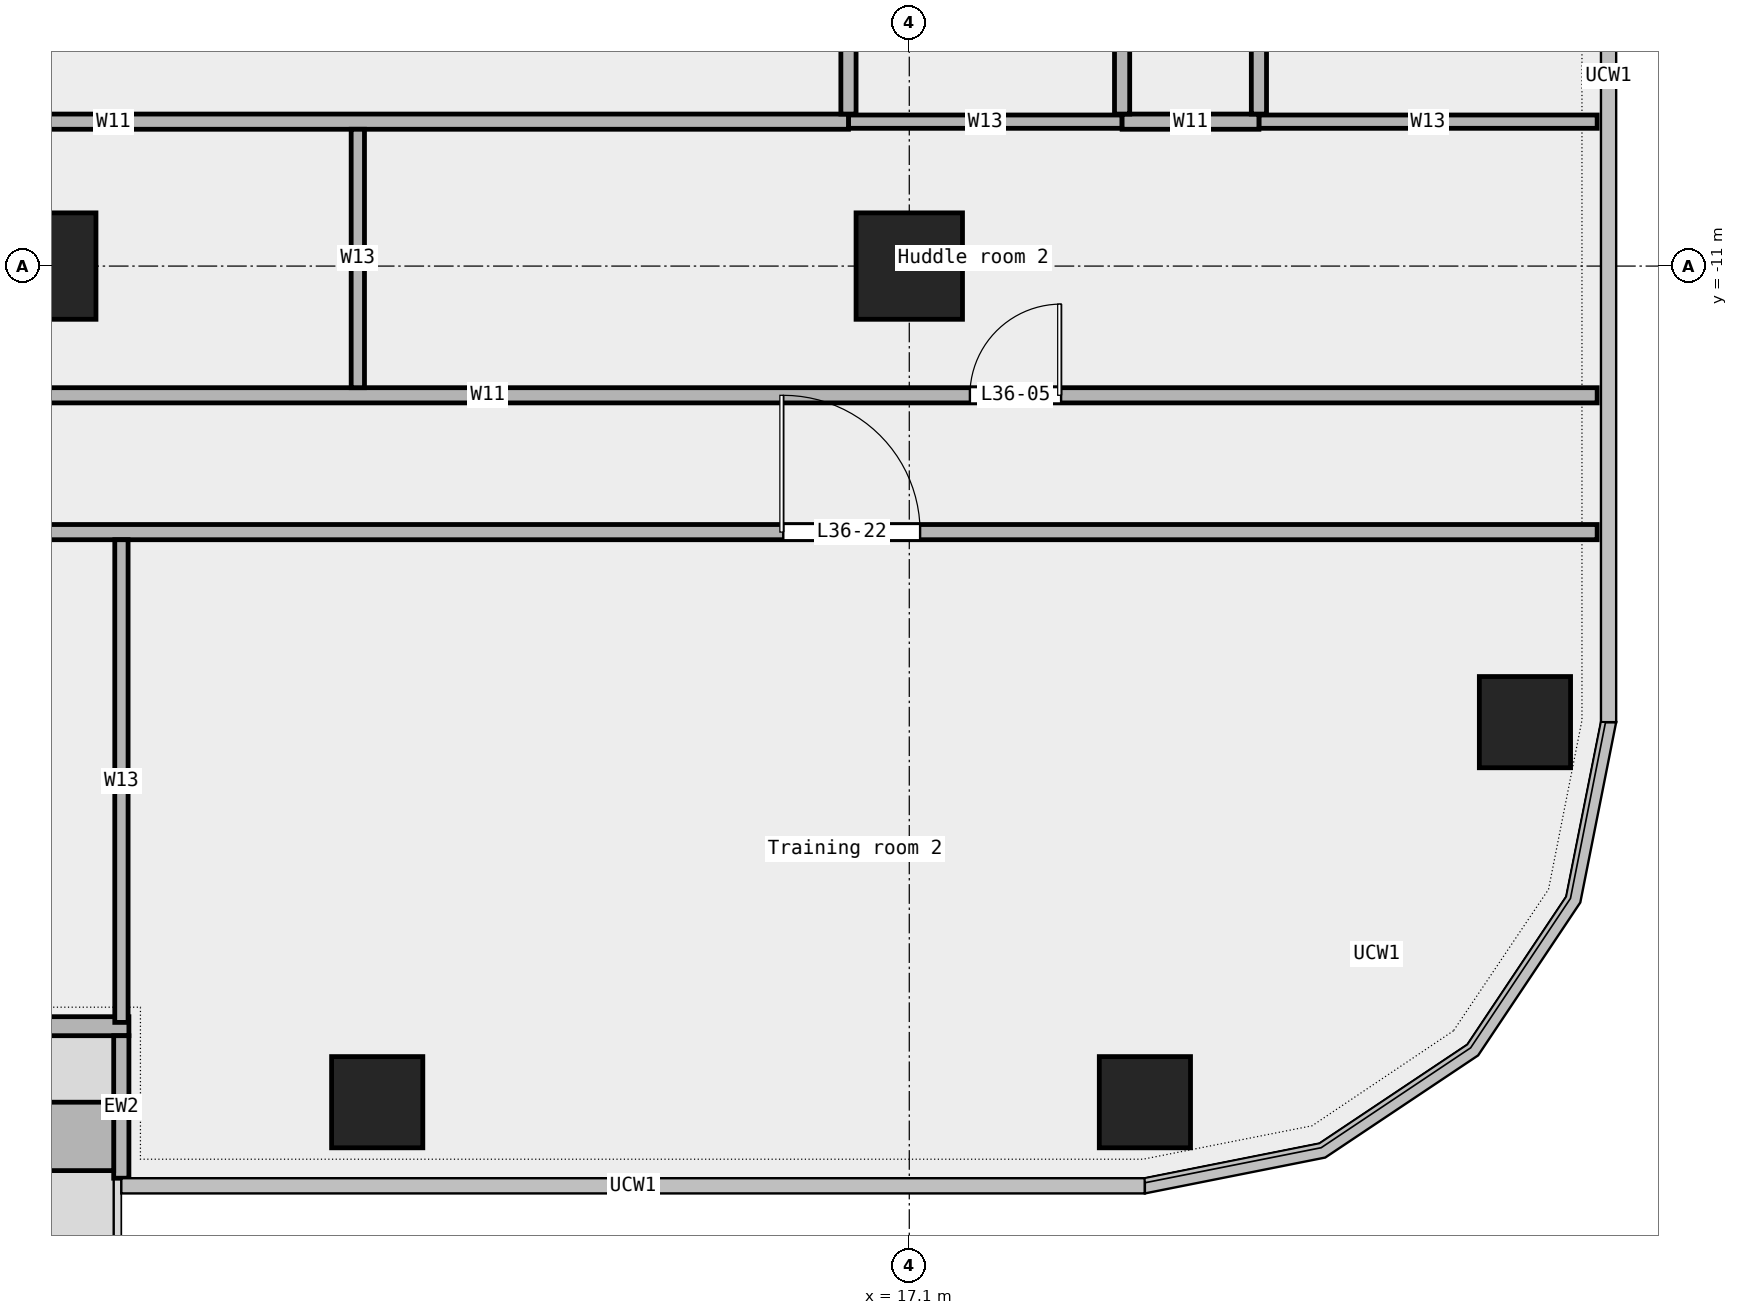
"""IFC4 building model, lengths in metres.
Left out: names, types, materials, properties, quantities, classifications, styles, units other than length and angle.
Written with IfcOpenShell. Run it as: python <this file> out.ifc"""

import sys

from ifc_helpers import new_model, si_unit, direction, frame, frame_2d, origin, origin_2d, place, context, subcontext, project, spatial, rectangle, extrude, element, fill, save


model = new_model("IFC4")
c1 = context("Model", 3, precision=1e-05, world=origin(), true_north=direction((0.0, 1.0)))
c2 = subcontext(c1, "Body", "Model", "MODEL_VIEW")
j1 = project(units=[si_unit("LENGTHUNIT", "METRE"), si_unit("PLANEANGLEUNIT", "RADIAN")], contexts=[c1])
p1 = place(None, origin())
s1 = spatial("IfcSite", under=j1, at=p1, CompositionType="ELEMENT")
p2 = place(p1, origin())
s2 = spatial("IfcBuilding", under=s1, at=p2, CompositionType="ELEMENT")
p3 = place(p2, frame((0.0, 0.0, 177.0)))
s3 = spatial("IfcBuildingStorey", under=s2, at=p3, CompositionType="ELEMENT", Elevation=177.0)
for number, where, z_axis, x_axis in (
    (1, (10.1, -22.0, 0.0), (0.0, 0.0, 1.0), (1.0, 0.0, 0.0)),
    (2, (20.2, -22.0, 0.0), (0.0, 0.0, 1.0), (1.0, 0.0, 0.0)),
    (3, (25.2, -17.0, 0.0), (0.0, 0.0, 1.0), (1.0, 0.0, 0.0)),
):
    element("IfcColumn", number, at=place(p3, frame(where, z_axis=z_axis, x_axis=x_axis)), inside=s3, PredefinedType="COLUMN", context=c2, shape_type="SweptSolid", body=[
        extrude(rectangle(XDim=1.2, YDim=1.2, at=origin_2d()), origin(), (0.0, 0.0, 1.0), 3.6),
    ])
for number, where, z_axis, x_axis in (
    (4, (5.7, -11.0, 0.0), (0.0, 0.0, 1.0), (1.0, 0.0, 0.0)),
    (5, (17.1, -11.0, 0.0), (0.0, 0.0, 1.0), (1.0, 0.0, 0.0)),
):
    element("IfcColumn", number, at=place(p3, frame(where, z_axis=z_axis, x_axis=x_axis)), inside=s3, PredefinedType="COLUMN", context=c2, shape_type="SweptSolid", body=[
        extrude(rectangle(XDim=1.4, YDim=1.4, at=origin_2d()), origin(), (0.0, 0.0, 1.0), 3.6),
    ])
p4 = place(p3, frame((-6.833, -21.0, 0.0), z_axis=(0.0, 0.0, 1.0), x_axis=(1.0, 0.0, 0.0)))
e6 = element("IfcWall", 6, at=p4, inside=s3, PredefinedType="STANDARD", context=c2, shape_type="SweptSolid", body=[
    extrude(rectangle(XDim=13.667, YDim=0.25, at=frame_2d((6.833, 0.0))), origin(), (0.0, 0.0, 1.0), 3.6),
])
p5 = place(p4, frame((1.75, 0.0, 0.45)))
e7 = element("IfcOpeningElement", 7, at=p5, cuts=e6, PredefinedType="OPENING", context=c2, shape_type="SweptSolid", body=[
    extrude(rectangle(XDim=1.5, YDim=2.4, at=frame_2d((0.75, 1.2))), frame((0.0, 0.137, 0.0), z_axis=(0.0, -1.0, 0.0), x_axis=(1.0, 0.0, 0.0)), (0.0, 0.0, 1.0), 0.274),
])
p6 = place(p4, frame((7.75, 0.0, 0.0)))
e8 = element("IfcOpeningElement", 8, at=p6, cuts=e6, PredefinedType="OPENING", context=c2, shape_type="SweptSolid", body=[
    extrude(rectangle(XDim=1.8, YDim=2.4, at=frame_2d((0.9, 1.2))), frame((0.0, 0.137, 0.0), z_axis=(0.0, -1.0, 0.0), x_axis=(1.0, 0.0, 0.0)), (0.0, 0.0, 1.0), 0.274),
])
p7 = place(p4, frame((10.5, 0.0, 0.45)))
e9 = element("IfcOpeningElement", 9, at=p7, cuts=e6, PredefinedType="OPENING", context=c2, shape_type="SweptSolid", body=[
    extrude(rectangle(XDim=1.5, YDim=2.4, at=frame_2d((0.75, 1.2))), frame((0.0, 0.137, 0.0), z_axis=(0.0, -1.0, 0.0), x_axis=(1.0, 0.0, 0.0)), (0.0, 0.0, 1.0), 0.274),
])
p8 = place(p3, frame((6.733, -23.0, 0.0), z_axis=(0.0, 0.0, 1.0), x_axis=(0.0, 1.0, 0.0)))
e10 = element("IfcWall", 10, at=p8, inside=s3, PredefinedType="STANDARD", context=c2, shape_type="SweptSolid", body=[
    extrude(rectangle(XDim=1.875, YDim=0.2, at=frame_2d((0.938, 0.0))), origin(), (0.0, 0.0, 1.0), 3.6),
])
p9 = place(p3, frame((3.033, -22.45, 0.0), z_axis=(0.0, 0.0, 1.0), x_axis=(1.0, 0.0, 0.0)))
e11 = element("IfcWall", 11, at=p9, inside=s3, PredefinedType="STANDARD", context=c2, shape_type="SweptSolid", body=[
    extrude(rectangle(XDim=3.6, YDim=0.9, at=frame_2d((1.8, 0.0))), origin(), (0.0, 0.0, 1.0), 0.7),
])
p10 = place(p3, frame((-26.15, -14.5, 0.0), z_axis=(0.0, 0.0, 1.0), x_axis=(1.0, 0.0, 0.0)))
e12 = element("IfcWall", 12, at=p10, inside=s3, PredefinedType="PARTITIONING", context=c2, shape_type="SweptSolid", body=[
    extrude(rectangle(XDim=52.3, YDim=0.2, at=frame_2d((26.15, 0.0))), origin(), (0.0, 0.0, 1.0), 3.6),
])
p11 = place(p10, frame((8.907, 0.0, 0.0)))
e13 = element("IfcOpeningElement", 13, at=p11, cuts=e12, PredefinedType="OPENING", context=c2, shape_type="SweptSolid", body=[
    extrude(rectangle(XDim=1.8, YDim=2.1, at=frame_2d((0.9, 1.05))), frame((0.0, 0.112, 0.0), z_axis=(0.0, -1.0, 0.0), x_axis=(1.0, 0.0, 0.0)), (0.0, 0.0, 1.0), 0.224),
])
p12 = place(p10, frame((25.55, 0.0, 0.0)))
e14 = element("IfcOpeningElement", 14, at=p12, cuts=e12, PredefinedType="OPENING", context=c2, shape_type="SweptSolid", body=[
    extrude(rectangle(XDim=1.2, YDim=2.1, at=frame_2d((0.6, 1.05))), frame((0.0, 0.112, 0.0), z_axis=(0.0, -1.0, 0.0), x_axis=(1.0, 0.0, 0.0)), (0.0, 0.0, 1.0), 0.224),
])
p13 = place(p10, frame((41.593, 0.0, 0.0)))
e15 = element("IfcOpeningElement", 15, at=p13, cuts=e12, PredefinedType="OPENING", context=c2, shape_type="SweptSolid", body=[
    extrude(rectangle(XDim=1.8, YDim=2.1, at=frame_2d((0.9, 1.05))), frame((0.0, 0.112, 0.0), z_axis=(0.0, -1.0, 0.0), x_axis=(1.0, 0.0, 0.0)), (0.0, 0.0, 1.0), 0.224),
])
p14 = place(p3, frame((-3.04, -12.7, 0.0), z_axis=(0.0, 0.0, 1.0), x_axis=(1.0, 0.0, 0.0)))
e16 = element("IfcWall", 16, at=p14, inside=s3, PredefinedType="PARTITIONING", context=c2, shape_type="SweptSolid", body=[
    extrude(rectangle(XDim=29.19, YDim=0.2, at=frame_2d((14.595, 0.0))), origin(), (0.0, 0.0, 1.0), 3.6),
])
p15 = place(p14, frame((20.938, 0.0, 0.0)))
e17 = element("IfcOpeningElement", 17, at=p15, cuts=e16, PredefinedType="OPENING", context=c2, shape_type="SweptSolid", body=[
    extrude(rectangle(XDim=1.2, YDim=2.1, at=frame_2d((0.6, 1.05))), frame((0.0, 0.112, 0.0), z_axis=(0.0, -1.0, 0.0), x_axis=(1.0, 0.0, 0.0)), (0.0, 0.0, 1.0), 0.224),
])
p16 = place(p3, frame((16.3, -9.1, 0.0), z_axis=(0.0, 0.0, 1.0), x_axis=(1.0, 0.0, 0.0)))
e18 = element("IfcWall", 18, at=p16, inside=s3, PredefinedType="PARTITIONING", context=c2, shape_type="SweptSolid", body=[
    extrude(rectangle(XDim=3.6, YDim=0.175, at=frame_2d((1.8, 0.0))), origin(), (0.0, 0.0, 1.0), 3.6),
])
p17 = place(p3, frame((21.7, -9.1, 0.0), z_axis=(0.0, 0.0, 1.0), x_axis=(1.0, 0.0, 0.0)))
e19 = element("IfcWall", 19, at=p17, inside=s3, PredefinedType="PARTITIONING", context=c2, shape_type="SweptSolid", body=[
    extrude(rectangle(XDim=4.45, YDim=0.175, at=frame_2d((2.225, 0.0))), origin(), (0.0, 0.0, 1.0), 3.6),
])
p18 = place(p3, frame((-3.04, -9.1, 0.0), z_axis=(0.0, 0.0, 1.0), x_axis=(1.0, 0.0, 0.0)))
e20 = element("IfcWall", 20, at=p18, inside=s3, PredefinedType="PARTITIONING", context=c2, shape_type="SweptSolid", body=[
    extrude(rectangle(XDim=19.34, YDim=0.2, at=frame_2d((9.67, 0.0))), origin(), (0.0, 0.0, 1.0), 3.6),
])
p19 = place(p18, frame((5.942, 0.0, 0.0)))
e21 = element("IfcOpeningElement", 21, at=p19, cuts=e20, PredefinedType="OPENING", context=c2, shape_type="SweptSolid", body=[
    extrude(rectangle(XDim=1.0, YDim=2.1, at=frame_2d((0.5, 1.05))), frame((0.0, 0.112, 0.0), z_axis=(0.0, -1.0, 0.0), x_axis=(1.0, 0.0, 0.0)), (0.0, 0.0, 1.0), 0.224),
])
p20 = place(p3, frame((19.9, -9.1, 0.0), z_axis=(0.0, 0.0, 1.0), x_axis=(1.0, 0.0, 0.0)))
e22 = element("IfcWall", 22, at=p20, inside=s3, PredefinedType="PARTITIONING", context=c2, shape_type="SweptSolid", body=[
    extrude(rectangle(XDim=1.8, YDim=0.2, at=frame_2d((0.9, 0.0))), origin(), (0.0, 0.0, 1.0), 3.6),
])
p21 = place(p3, frame((6.735, -20.95, 0.0), z_axis=(0.0, 0.0, 1.0), x_axis=(0.0, 1.0, 0.0)))
e23 = element("IfcWall", 23, at=p21, inside=s3, PredefinedType="PARTITIONING", context=c2, shape_type="SweptSolid", body=[
    extrude(rectangle(XDim=6.35, YDim=0.175, at=frame_2d((3.175, 0.0))), origin(), (0.0, 0.0, 1.0), 3.6),
])
p22 = place(p3, frame((9.845, -12.6, 0.0), z_axis=(0.0, 0.0, 1.0), x_axis=(0.0, 1.0, 0.0)))
e24 = element("IfcWall", 24, at=p22, inside=s3, PredefinedType="PARTITIONING", context=c2, shape_type="SweptSolid", body=[
    extrude(rectangle(XDim=3.4, YDim=0.175, at=frame_2d((1.7, 0.0))), origin(), (0.0, 0.0, 1.0), 3.6),
])
p23 = place(p3, frame((16.3, -9.0, 0.0), z_axis=(0.0, 0.0, 1.0), x_axis=(0.0, 1.0, 0.0)))
e25 = element("IfcWall", 25, at=p23, inside=s3, PredefinedType="PARTITIONING", context=c2, shape_type="SweptSolid", body=[
    extrude(rectangle(XDim=6.25, YDim=0.2, at=frame_2d((3.125, 0.0))), origin(), (0.0, 0.0, 1.0), 3.6),
])
p24 = place(p3, frame((19.9, -9.0, 0.0), z_axis=(0.0, 0.0, 1.0), x_axis=(0.0, 1.0, 0.0)))
e26 = element("IfcWall", 26, at=p24, inside=s3, PredefinedType="PARTITIONING", context=c2, shape_type="SweptSolid", body=[
    extrude(rectangle(XDim=6.25, YDim=0.2, at=frame_2d((3.125, 0.0))), origin(), (0.0, 0.0, 1.0), 3.6),
])
p25 = place(p24, frame((2.675, 0.0, 0.0)))
e27 = element("IfcOpeningElement", 27, at=p25, cuts=e26, PredefinedType="OPENING", context=c2, shape_type="SweptSolid", body=[
    extrude(rectangle(XDim=0.9, YDim=2.1, at=frame_2d((0.45, 1.05))), frame((0.0, 0.112, 0.0), z_axis=(0.0, -1.0, 0.0), x_axis=(1.0, 0.0, 0.0)), (0.0, 0.0, 1.0), 0.224),
])
p26 = place(p3, frame((21.7, -9.0, 0.0), z_axis=(0.0, 0.0, 1.0), x_axis=(0.0, 1.0, 0.0)))
e28 = element("IfcWall", 28, at=p26, inside=s3, PredefinedType="PARTITIONING", context=c2, shape_type="SweptSolid", body=[
    extrude(rectangle(XDim=24.3, YDim=0.2, at=frame_2d((12.15, 0.0))), origin(), (0.0, 0.0, 1.0), 3.6),
])
p27 = place(p26, frame((3.583, 0.0, 0.0)))
e29 = element("IfcOpeningElement", 29, at=p27, cuts=e28, PredefinedType="OPENING", context=c2, shape_type="SweptSolid", body=[
    extrude(rectangle(XDim=0.9, YDim=2.1, at=frame_2d((0.45, 1.05))), frame((0.0, 0.112, 0.0), z_axis=(0.0, -1.0, 0.0), x_axis=(1.0, 0.0, 0.0)), (0.0, 0.0, 1.0), 0.224),
])
p28 = place(p26, frame((22.575, 0.0, 0.0)))
e30 = element("IfcOpeningElement", 30, at=p28, cuts=e28, PredefinedType="OPENING", context=c2, shape_type="SweptSolid", body=[
    extrude(rectangle(XDim=0.9, YDim=2.1, at=frame_2d((0.45, 1.05))), frame((0.0, 0.112, 0.0), z_axis=(0.0, -1.0, 0.0), x_axis=(1.0, 0.0, 0.0)), (0.0, 0.0, 1.0), 0.224),
])
p29 = place(p26, frame((14.925, 0.0, 0.0)))
e31 = element("IfcOpeningElement", 31, at=p29, cuts=e28, PredefinedType="OPENING", context=c2, shape_type="SweptSolid", body=[
    extrude(rectangle(XDim=0.9, YDim=2.1, at=frame_2d((0.45, 1.05))), frame((0.0, 0.112, 0.0), z_axis=(0.0, -1.0, 0.0), x_axis=(1.0, 0.0, 0.0)), (0.0, 0.0, 1.0), 0.224),
])
p30 = place(p15, origin())
e32 = element("IfcDoor", 32, at=p30, inside=s3, OperationType="SINGLE_SWING_RIGHT", PredefinedType="DOOR", context=c2, shape_type="SweptSolid", body=[
    extrude(rectangle(XDim=1.2, YDim=2.1, at=frame_2d((0.6, 1.05))), frame((0.0, 0.025, 0.0), z_axis=(0.0, -1.0, 0.0), x_axis=(1.0, 0.0, 0.0)), (0.0, 0.0, 1.0), 0.05),
])
fill(e17, e32)
p31 = place(p13, origin())
e33 = element("IfcDoor", 33, at=p31, inside=s3, OperationType="DOUBLE_DOOR_SINGLE_SWING", PredefinedType="DOOR", context=c2, shape_type="SweptSolid", body=[
    extrude(rectangle(XDim=1.8, YDim=2.1, at=frame_2d((0.9, 1.05))), frame((0.0, 0.025, 0.0), z_axis=(0.0, -1.0, 0.0), x_axis=(1.0, 0.0, 0.0)), (0.0, 0.0, 1.0), 0.05),
])
fill(e15, e33)
save(model, sys.argv[1])
